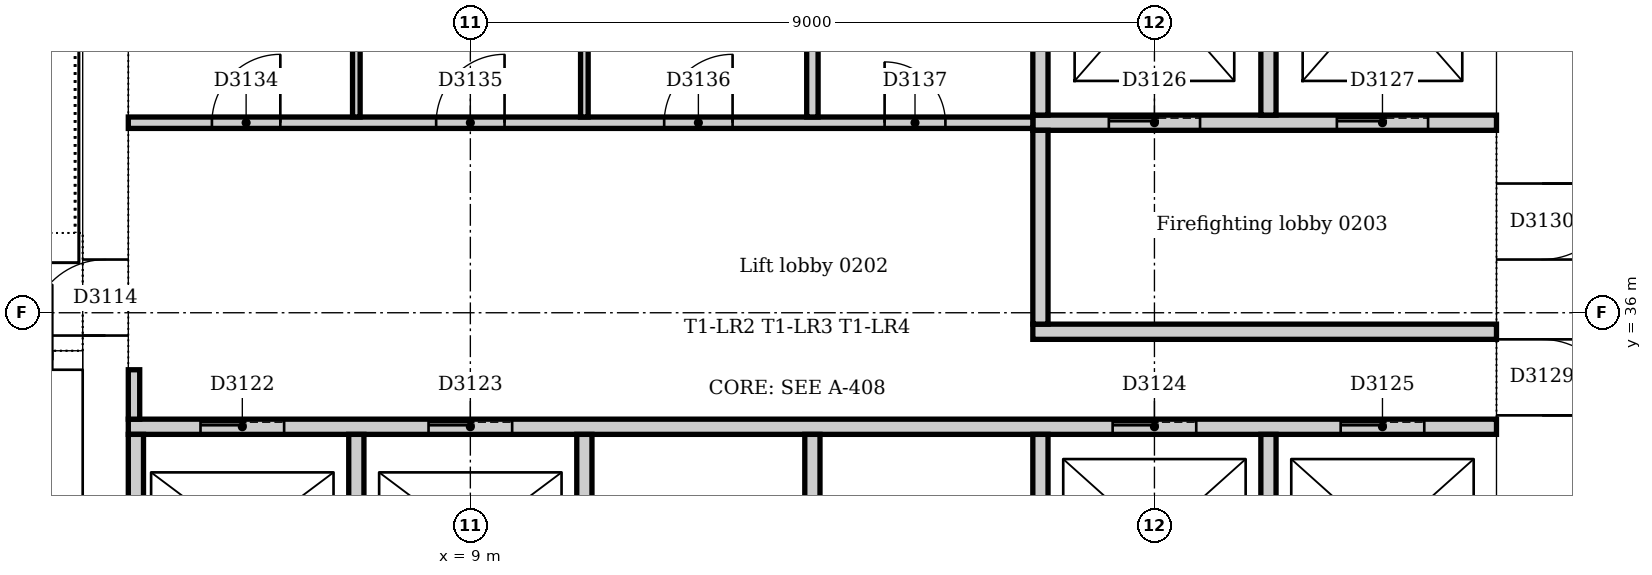
"""IFC4 building model, lengths in metres.
Left out: names, types, materials, properties, quantities, classifications, styles, units other than length and angle.
Written with IfcOpenShell. Run it as: python <this file> out.ifc"""

import sys

from ifc_helpers import new_model, si_unit, direction, frame, frame_2d, origin, place, context, subcontext, project, spatial, rectangle, extrude, element, fill, save


model = new_model("IFC4")
c1 = context("Model", 3, precision=1e-05, world=origin(), true_north=direction((0.0, 1.0)))
c2 = subcontext(c1, "Body", "Model", "MODEL_VIEW")
j1 = project(units=[si_unit("LENGTHUNIT", "METRE"), si_unit("PLANEANGLEUNIT", "RADIAN")], contexts=[c1])
p1 = place(None, origin())
s1 = spatial("IfcSite", under=j1, at=p1, CompositionType="ELEMENT")
p2 = place(p1, origin())
s2 = spatial("IfcBuilding", under=s1, at=p2, CompositionType="ELEMENT")
p3 = place(p2, frame((0.0, 0.0, 11.0)))
s3 = spatial("IfcBuildingStorey", under=s2, at=p3, CompositionType="ELEMENT", Elevation=11.0)
p4 = place(p3, frame((23.1, 31.5, 0.0), z_axis=(0.0, 0.0, 1.0), x_axis=(0.0, 1.0, 0.0)))
e1 = element("IfcWall", 1, at=p4, inside=s3, PredefinedType="SOLIDWALL", context=c2, shape_type="SweptSolid", body=[
    extrude(rectangle(XDim=10.5, YDim=1.2, at=frame_2d((5.25, 0.0))), origin(), (0.0, 0.0, 1.0), 5.0),
])
p5 = place(p4, frame((3.15, 0.0, 0.0)))
e2 = element("IfcOpeningElement", 2, at=p5, cuts=e1, PredefinedType="OPENING", context=c2, shape_type="SweptSolid", body=[
    extrude(rectangle(XDim=1.0, YDim=2.1, at=frame_2d((0.5, 1.05))), frame((0.0, 0.61, 0.0), z_axis=(0.0, -1.0, 0.0), x_axis=(1.0, 0.0, 0.0)), (0.0, 0.0, 1.0), 1.22),
])
p6 = place(p4, frame((5.2, 0.0, 0.0)))
e3 = element("IfcOpeningElement", 3, at=p6, cuts=e1, PredefinedType="OPENING", context=c2, shape_type="SweptSolid", body=[
    extrude(rectangle(XDim=1.0, YDim=2.1, at=frame_2d((0.5, 1.05))), frame((0.0, 0.61, 0.0), z_axis=(0.0, -1.0, 0.0), x_axis=(1.0, 0.0, 0.0)), (0.0, 0.0, 1.0), 1.22),
])
p7 = place(p3, frame((4.2, 42.0, 0.0), z_axis=(0.0, 0.0, 1.0), x_axis=(0.0, -1.0, 0.0)))
e4 = element("IfcWall", 4, at=p7, inside=s3, PredefinedType="SOLIDWALL", context=c2, shape_type="SweptSolid", body=[
    extrude(rectangle(XDim=10.5, YDim=0.6, at=frame_2d((5.25, 0.0))), origin(), (0.0, 0.0, 1.0), 5.0),
])
p8 = place(p7, frame((5.3, 0.0, 0.0)))
e5 = element("IfcOpeningElement", 5, at=p8, cuts=e4, PredefinedType="OPENING", context=c2, shape_type="SweptSolid", body=[
    extrude(rectangle(XDim=1.0, YDim=2.1, at=frame_2d((0.5, 1.05))), frame((0.0, 0.31, 0.0), z_axis=(0.0, -1.0, 0.0), x_axis=(1.0, 0.0, 0.0)), (0.0, 0.0, 1.0), 0.62),
])
p9 = place(p3, frame((0.36, 35.375, 0.0), z_axis=(0.0, 0.0, 1.0), x_axis=(1.0, 0.0, 0.0)))
e6 = element("IfcWall", 6, at=p9, inside=s3, PredefinedType="SOLIDWALL", context=c2, shape_type="SweptSolid", body=[
    extrude(rectangle(XDim=3.54, YDim=0.25, at=frame_2d((1.77, 0.0))), origin(), (0.0, 0.0, 1.0), 5.0),
])
p10 = place(p9, frame((2.14, 0.0, 0.0)))
e7 = element("IfcOpeningElement", 7, at=p10, cuts=e6, PredefinedType="OPENING", context=c2, shape_type="SweptSolid", body=[
    extrude(rectangle(XDim=1.0, YDim=2.1, at=frame_2d((0.5, 1.05))), frame((0.0, 0.135, 0.0), z_axis=(0.0, -1.0, 0.0), x_axis=(1.0, 0.0, 0.0)), (0.0, 0.0, 1.0), 0.27),
])
p11 = place(p3, frame((16.4, 35.75, 0.0), z_axis=(0.0, 0.0, 1.0), x_axis=(1.0, 0.0, 0.0)))
e8 = element("IfcWall", 8, at=p11, inside=s3, PredefinedType="PARTITIONING", context=c2, shape_type="SweptSolid", body=[
    extrude(rectangle(XDim=6.1, YDim=0.2, at=frame_2d((3.05, 0.0))), origin(), (0.0, 0.0, 1.0), 4.7),
])
p12 = place(p3, frame((16.4, 38.5, 0.0), z_axis=(0.0, 0.0, 1.0), x_axis=(1.0, 0.0, 0.0)))
e9 = element("IfcWall", 9, at=p12, inside=s3, PredefinedType="PARTITIONING", context=c2, shape_type="SweptSolid", body=[
    extrude(rectangle(XDim=6.1, YDim=0.2, at=frame_2d((3.05, 0.0))), origin(), (0.0, 0.0, 1.0), 4.7),
])
p13 = place(p12, frame((1.0, 0.0, 0.0)))
e10 = element("IfcOpeningElement", 10, at=p13, cuts=e9, PredefinedType="OPENING", context=c2, shape_type="SweptSolid", body=[
    extrude(rectangle(XDim=1.2, YDim=2.1, at=frame_2d((0.6, 1.05))), frame((0.0, 0.11, 0.0), z_axis=(0.0, -1.0, 0.0), x_axis=(1.0, 0.0, 0.0)), (0.0, 0.0, 1.0), 0.22),
])
p14 = place(p12, frame((4.0, 0.0, 0.0)))
e11 = element("IfcOpeningElement", 11, at=p14, cuts=e9, PredefinedType="OPENING", context=c2, shape_type="SweptSolid", body=[
    extrude(rectangle(XDim=1.2, YDim=2.1, at=frame_2d((0.6, 1.05))), frame((0.0, 0.11, 0.0), z_axis=(0.0, -1.0, 0.0), x_axis=(1.0, 0.0, 0.0)), (0.0, 0.0, 1.0), 0.22),
])
p15 = place(p3, frame((16.5, 35.85, 0.0), z_axis=(0.0, 0.0, 1.0), x_axis=(0.0, 1.0, 0.0)))
e12 = element("IfcWall", 12, at=p15, inside=s3, PredefinedType="PARTITIONING", context=c2, shape_type="SweptSolid", body=[
    extrude(rectangle(XDim=2.55, YDim=0.2, at=frame_2d((1.275, 0.0))), origin(), (0.0, 0.0, 1.0), 4.7),
])
p16 = place(p3, frame((4.5, 34.5, 0.0), z_axis=(0.0, 0.0, 1.0), x_axis=(1.0, 0.0, 0.0)))
e13 = element("IfcWall", 13, at=p16, inside=s3, PredefinedType="PARTITIONING", context=c2, shape_type="SweptSolid", body=[
    extrude(rectangle(XDim=18.0, YDim=0.2, at=frame_2d((9.0, 0.0))), origin(), (0.0, 0.0, 1.0), 4.7),
])
p17 = place(p16, frame((0.95, 0.0, 0.0)))
e14 = element("IfcOpeningElement", 14, at=p17, cuts=e13, PredefinedType="OPENING", context=c2, shape_type="SweptSolid", body=[
    extrude(rectangle(XDim=1.1, YDim=2.1, at=frame_2d((0.55, 1.05))), frame((0.0, 0.11, 0.0), z_axis=(0.0, -1.0, 0.0), x_axis=(1.0, 0.0, 0.0)), (0.0, 0.0, 1.0), 0.22),
])
p18 = place(p16, frame((3.95, 0.0, 0.0)))
e15 = element("IfcOpeningElement", 15, at=p18, cuts=e13, PredefinedType="OPENING", context=c2, shape_type="SweptSolid", body=[
    extrude(rectangle(XDim=1.1, YDim=2.1, at=frame_2d((0.55, 1.05))), frame((0.0, 0.11, 0.0), z_axis=(0.0, -1.0, 0.0), x_axis=(1.0, 0.0, 0.0)), (0.0, 0.0, 1.0), 0.22),
])
p19 = place(p16, frame((12.95, 0.0, 0.0)))
e16 = element("IfcOpeningElement", 16, at=p19, cuts=e13, PredefinedType="OPENING", context=c2, shape_type="SweptSolid", body=[
    extrude(rectangle(XDim=1.1, YDim=2.1, at=frame_2d((0.55, 1.05))), frame((0.0, 0.11, 0.0), z_axis=(0.0, -1.0, 0.0), x_axis=(1.0, 0.0, 0.0)), (0.0, 0.0, 1.0), 0.22),
])
p20 = place(p16, frame((15.95, 0.0, 0.0)))
e17 = element("IfcOpeningElement", 17, at=p20, cuts=e13, PredefinedType="OPENING", context=c2, shape_type="SweptSolid", body=[
    extrude(rectangle(XDim=1.1, YDim=2.1, at=frame_2d((0.55, 1.05))), frame((0.0, 0.11, 0.0), z_axis=(0.0, -1.0, 0.0), x_axis=(1.0, 0.0, 0.0)), (0.0, 0.0, 1.0), 0.22),
])
for number, where, z_axis, x_axis in (
    (18, (16.5, 38.6, 0.0), (0.0, 0.0, 1.0), (0.0, 1.0, 0.0)),
    (19, (19.5, 38.6, 0.0), (0.0, 0.0, 1.0), (0.0, 1.0, 0.0)),
):
    element("IfcWall", number, at=place(p3, frame(where, z_axis=z_axis, x_axis=x_axis)), inside=s3, PredefinedType="PARTITIONING", context=c2, shape_type="SweptSolid", body=[
        extrude(rectangle(XDim=3.4, YDim=0.2, at=frame_2d((1.7, 0.0))), origin(), (0.0, 0.0, 1.0), 4.7),
    ])
for number, where, z_axis, x_axis in (
    (20, (4.6, 31.75, 0.0), (0.0, 0.0, 1.0), (0.0, 1.0, 0.0)),
    (21, (7.5, 31.75, 0.0), (0.0, 0.0, 1.0), (0.0, 1.0, 0.0)),
    (22, (10.5, 31.75, 0.0), (0.0, 0.0, 1.0), (0.0, 1.0, 0.0)),
    (23, (13.5, 31.75, 0.0), (0.0, 0.0, 1.0), (0.0, 1.0, 0.0)),
    (24, (16.5, 31.75, 0.0), (0.0, 0.0, 1.0), (0.0, 1.0, 0.0)),
    (25, (19.5, 31.75, 0.0), (0.0, 0.0, 1.0), (0.0, 1.0, 0.0)),
):
    element("IfcWall", number, at=place(p3, frame(where, z_axis=z_axis, x_axis=x_axis)), inside=s3, PredefinedType="PARTITIONING", context=c2, shape_type="SweptSolid", body=[
        extrude(rectangle(XDim=2.65, YDim=0.2, at=frame_2d((1.325, 0.0))), origin(), (0.0, 0.0, 1.0), 4.7),
    ])
p21 = place(p3, frame((4.5, 38.5, 0.0), z_axis=(0.0, 0.0, 1.0), x_axis=(1.0, 0.0, 0.0)))
e26 = element("IfcWall", 26, at=p21, inside=s3, PredefinedType="PARTITIONING", context=c2, shape_type="SweptSolid", body=[
    extrude(rectangle(XDim=11.9, YDim=0.15, at=frame_2d((5.95, 0.0))), origin(), (0.0, 0.0, 1.0), 4.7),
])
p22 = place(p21, frame((1.1, 0.0, 0.0)))
e27 = element("IfcOpeningElement", 27, at=p22, cuts=e26, PredefinedType="OPENING", context=c2, shape_type="SweptSolid", body=[
    extrude(rectangle(XDim=0.9, YDim=2.1, at=frame_2d((0.45, 1.05))), frame((0.0, 0.085, 0.0), z_axis=(0.0, -1.0, 0.0), x_axis=(1.0, 0.0, 0.0)), (0.0, 0.0, 1.0), 0.17),
])
p23 = place(p21, frame((4.05, 0.0, 0.0)))
e28 = element("IfcOpeningElement", 28, at=p23, cuts=e26, PredefinedType="OPENING", context=c2, shape_type="SweptSolid", body=[
    extrude(rectangle(XDim=0.9, YDim=2.1, at=frame_2d((0.45, 1.05))), frame((0.0, 0.085, 0.0), z_axis=(0.0, -1.0, 0.0), x_axis=(1.0, 0.0, 0.0)), (0.0, 0.0, 1.0), 0.17),
])
p24 = place(p21, frame((7.05, 0.0, 0.0)))
e29 = element("IfcOpeningElement", 29, at=p24, cuts=e26, PredefinedType="OPENING", context=c2, shape_type="SweptSolid", body=[
    extrude(rectangle(XDim=0.9, YDim=2.1, at=frame_2d((0.45, 1.05))), frame((0.0, 0.085, 0.0), z_axis=(0.0, -1.0, 0.0), x_axis=(1.0, 0.0, 0.0)), (0.0, 0.0, 1.0), 0.17),
])
p25 = place(p21, frame((9.95, 0.0, 0.0)))
e30 = element("IfcOpeningElement", 30, at=p25, cuts=e26, PredefinedType="OPENING", context=c2, shape_type="SweptSolid", body=[
    extrude(rectangle(XDim=0.8, YDim=2.1, at=frame_2d((0.4, 1.05))), frame((0.0, 0.085, 0.0), z_axis=(0.0, -1.0, 0.0), x_axis=(1.0, 0.0, 0.0)), (0.0, 0.0, 1.0), 0.17),
])
p26 = place(p3, frame((4.575, 34.6, 0.0), z_axis=(0.0, 0.0, 1.0), x_axis=(0.0, 1.0, 0.0)))
e31 = element("IfcWall", 31, at=p26, inside=s3, PredefinedType="PARTITIONING", context=c2, shape_type="SweptSolid", body=[
    extrude(rectangle(XDim=0.65, YDim=0.15, at=frame_2d((0.325, 0.0))), origin(), (0.0, 0.0, 1.0), 4.7),
])
p27 = place(p3, frame((13.5, 38.575, 0.0), z_axis=(0.0, 0.0, 1.0), x_axis=(0.0, 1.0, 0.0)))
e32 = element("IfcWall", 32, at=p27, inside=s3, PredefinedType="PARTITIONING", context=c2, shape_type="SweptSolid", body=[
    extrude(rectangle(XDim=3.425, YDim=0.15, at=frame_2d((1.712, 0.0))), origin(), (0.0, 0.0, 1.0), 4.7),
])
for number, where, z_axis, x_axis in (
    (33, (7.5, 38.575, 0.0), (0.0, 0.0, 1.0), (0.0, 1.0, 0.0)),
    (34, (10.5, 38.575, 0.0), (0.0, 0.0, 1.0), (0.0, 1.0, 0.0)),
):
    element("IfcWall", number, at=place(p3, frame(where, z_axis=z_axis, x_axis=x_axis)), inside=s3, PredefinedType="PARTITIONING", context=c2, shape_type="SweptSolid", body=[
        extrude(rectangle(XDim=3.425, YDim=0.1, at=frame_2d((1.712, 0.0))), origin(), (0.0, 0.0, 1.0), 4.7),
    ])
p28 = place(p8, frame((1.0, 0.0, 0.0), z_axis=(0.0, 0.0, 1.0), x_axis=(-1.0, 0.0, 0.0)))
e35 = element("IfcDoor", 35, at=p28, inside=s3, OperationType="SINGLE_SWING_LEFT", PredefinedType="DOOR", context=c2, shape_type="SweptSolid", body=[
    extrude(rectangle(XDim=1.0, YDim=2.1, at=frame_2d((0.5, 1.05))), frame((0.0, 0.025, 0.0), z_axis=(0.0, -1.0, 0.0), x_axis=(1.0, 0.0, 0.0)), (0.0, 0.0, 1.0), 0.05),
])
fill(e5, e35)
p29 = place(p17, origin())
e36 = element("IfcDoor", 36, at=p29, inside=s3, OperationType="SLIDING_TO_LEFT", PredefinedType="DOOR", context=c2, shape_type="SweptSolid", body=[
    extrude(rectangle(XDim=1.1, YDim=2.1, at=frame_2d((0.55, 1.05))), frame((0.0, 0.025, 0.0), z_axis=(0.0, -1.0, 0.0), x_axis=(1.0, 0.0, 0.0)), (0.0, 0.0, 1.0), 0.05),
])
fill(e14, e36)
p30 = place(p18, origin())
e37 = element("IfcDoor", 37, at=p30, inside=s3, OperationType="SLIDING_TO_LEFT", PredefinedType="DOOR", context=c2, shape_type="SweptSolid", body=[
    extrude(rectangle(XDim=1.1, YDim=2.1, at=frame_2d((0.55, 1.05))), frame((0.0, 0.025, 0.0), z_axis=(0.0, -1.0, 0.0), x_axis=(1.0, 0.0, 0.0)), (0.0, 0.0, 1.0), 0.05),
])
fill(e15, e37)
p31 = place(p19, origin())
e38 = element("IfcDoor", 38, at=p31, inside=s3, OperationType="SLIDING_TO_LEFT", PredefinedType="DOOR", context=c2, shape_type="SweptSolid", body=[
    extrude(rectangle(XDim=1.1, YDim=2.1, at=frame_2d((0.55, 1.05))), frame((0.0, 0.025, 0.0), z_axis=(0.0, -1.0, 0.0), x_axis=(1.0, 0.0, 0.0)), (0.0, 0.0, 1.0), 0.05),
])
fill(e16, e38)
p32 = place(p20, origin())
e39 = element("IfcDoor", 39, at=p32, inside=s3, OperationType="SLIDING_TO_LEFT", PredefinedType="DOOR", context=c2, shape_type="SweptSolid", body=[
    extrude(rectangle(XDim=1.1, YDim=2.1, at=frame_2d((0.55, 1.05))), frame((0.0, 0.025, 0.0), z_axis=(0.0, -1.0, 0.0), x_axis=(1.0, 0.0, 0.0)), (0.0, 0.0, 1.0), 0.05),
])
fill(e17, e39)
p33 = place(p13, origin())
e40 = element("IfcDoor", 40, at=p33, inside=s3, OperationType="SLIDING_TO_LEFT", PredefinedType="DOOR", context=c2, shape_type="SweptSolid", body=[
    extrude(rectangle(XDim=1.2, YDim=2.1, at=frame_2d((0.6, 1.05))), frame((0.0, 0.025, 0.0), z_axis=(0.0, -1.0, 0.0), x_axis=(1.0, 0.0, 0.0)), (0.0, 0.0, 1.0), 0.05),
])
fill(e10, e40)
p34 = place(p14, origin())
e41 = element("IfcDoor", 41, at=p34, inside=s3, OperationType="SLIDING_TO_LEFT", PredefinedType="DOOR", context=c2, shape_type="SweptSolid", body=[
    extrude(rectangle(XDim=1.2, YDim=2.1, at=frame_2d((0.6, 1.05))), frame((0.0, 0.025, 0.0), z_axis=(0.0, -1.0, 0.0), x_axis=(1.0, 0.0, 0.0)), (0.0, 0.0, 1.0), 0.05),
])
fill(e11, e41)
p35 = place(p5, frame((1.0, 0.0, 0.0), z_axis=(0.0, 0.0, 1.0), x_axis=(-1.0, 0.0, 0.0)))
e42 = element("IfcDoor", 42, at=p35, inside=s3, OperationType="SINGLE_SWING_RIGHT", PredefinedType="DOOR", context=c2, shape_type="SweptSolid", body=[
    extrude(rectangle(XDim=1.0, YDim=2.1, at=frame_2d((0.5, 1.05))), frame((0.0, 0.025, 0.0), z_axis=(0.0, -1.0, 0.0), x_axis=(1.0, 0.0, 0.0)), (0.0, 0.0, 1.0), 0.05),
])
fill(e2, e42)
p36 = place(p6, frame((1.0, 0.0, 0.0), z_axis=(0.0, 0.0, 1.0), x_axis=(-1.0, 0.0, 0.0)))
e43 = element("IfcDoor", 43, at=p36, inside=s3, OperationType="SINGLE_SWING_LEFT", PredefinedType="DOOR", context=c2, shape_type="SweptSolid", body=[
    extrude(rectangle(XDim=1.0, YDim=2.1, at=frame_2d((0.5, 1.05))), frame((0.0, 0.025, 0.0), z_axis=(0.0, -1.0, 0.0), x_axis=(1.0, 0.0, 0.0)), (0.0, 0.0, 1.0), 0.05),
])
fill(e3, e43)
p37 = place(p22, origin())
e44 = element("IfcDoor", 44, at=p37, inside=s3, OperationType="SINGLE_SWING_RIGHT", PredefinedType="DOOR", context=c2, shape_type="SweptSolid", body=[
    extrude(rectangle(XDim=0.9, YDim=2.1, at=frame_2d((0.45, 1.05))), frame((0.0, 0.025, 0.0), z_axis=(0.0, -1.0, 0.0), x_axis=(1.0, 0.0, 0.0)), (0.0, 0.0, 1.0), 0.05),
])
fill(e27, e44)
p38 = place(p23, origin())
e45 = element("IfcDoor", 45, at=p38, inside=s3, OperationType="SINGLE_SWING_RIGHT", PredefinedType="DOOR", context=c2, shape_type="SweptSolid", body=[
    extrude(rectangle(XDim=0.9, YDim=2.1, at=frame_2d((0.45, 1.05))), frame((0.0, 0.025, 0.0), z_axis=(0.0, -1.0, 0.0), x_axis=(1.0, 0.0, 0.0)), (0.0, 0.0, 1.0), 0.05),
])
fill(e28, e45)
p39 = place(p24, origin())
e46 = element("IfcDoor", 46, at=p39, inside=s3, OperationType="SINGLE_SWING_RIGHT", PredefinedType="DOOR", context=c2, shape_type="SweptSolid", body=[
    extrude(rectangle(XDim=0.9, YDim=2.1, at=frame_2d((0.45, 1.05))), frame((0.0, 0.025, 0.0), z_axis=(0.0, -1.0, 0.0), x_axis=(1.0, 0.0, 0.0)), (0.0, 0.0, 1.0), 0.05),
])
fill(e29, e46)
p40 = place(p25, origin())
e47 = element("IfcDoor", 47, at=p40, inside=s3, OperationType="SINGLE_SWING_LEFT", PredefinedType="DOOR", context=c2, shape_type="SweptSolid", body=[
    extrude(rectangle(XDim=0.8, YDim=2.1, at=frame_2d((0.4, 1.05))), frame((0.0, 0.025, 0.0), z_axis=(0.0, -1.0, 0.0), x_axis=(1.0, 0.0, 0.0)), (0.0, 0.0, 1.0), 0.05),
])
fill(e30, e47)
save(model, sys.argv[1])
